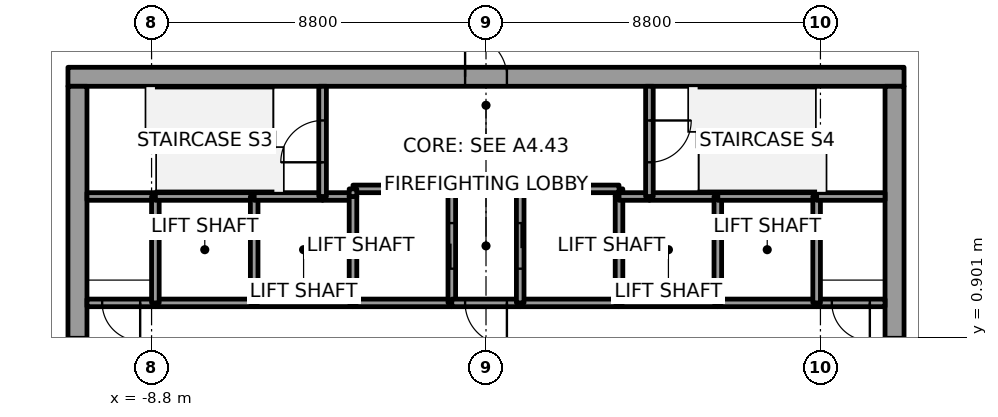
"""IFC4 building model, lengths in metres.
Left out: names, types, materials, properties, quantities, classifications, styles, units other than length and angle.
Written with IfcOpenShell. Run it as: python <this file> out.ifc"""

import sys

from ifc_helpers import new_model, si_unit, direction, frame, frame_2d, origin, place, context, subcontext, project, spatial, rectangle, extrude, element, fill, save


model = new_model("IFC4")
c1 = context("Model", 3, precision=1e-05, world=origin(), true_north=direction((0.0, 1.0)))
c2 = subcontext(c1, "Body", "Model", "MODEL_VIEW")
j1 = project(units=[si_unit("LENGTHUNIT", "METRE"), si_unit("PLANEANGLEUNIT", "RADIAN")], contexts=[c1])
p1 = place(None, origin())
s1 = spatial("IfcSite", under=j1, at=p1, CompositionType="ELEMENT")
p2 = place(p1, origin())
s2 = spatial("IfcBuilding", under=s1, at=p2, CompositionType="ELEMENT")
p3 = place(p2, frame((0.0, 0.0, 185.8)))
s3 = spatial("IfcBuildingStorey", under=s2, at=p3, CompositionType="ELEMENT", Elevation=185.8)
p4 = place(p3, frame((-11.0, 7.75, 0.0), z_axis=(0.0, 0.0, 1.0), x_axis=(1.0, 0.0, 0.0)))
e1 = element("IfcWall", 1, at=p4, inside=s3, PredefinedType="SHEAR", context=c2, shape_type="SweptSolid", body=[
    extrude(rectangle(XDim=22.0, YDim=0.5, at=frame_2d((11.0, 0.0))), origin(), (0.0, 0.0, 1.0), 4.0),
])
p5 = place(p4, frame((10.45, 0.0, 0.0)))
e2 = element("IfcOpeningElement", 2, at=p5, cuts=e1, PredefinedType="OPENING", context=c2, shape_type="SweptSolid", body=[
    extrude(rectangle(XDim=1.1, YDim=2.1, at=frame_2d((0.55, 1.05))), frame((0.0, 0.25, 0.0), z_axis=(0.0, -1.0, 0.0), x_axis=(1.0, 0.0, 0.0)), (0.0, 0.0, 1.0), 0.5),
])
p6 = place(p3, frame((-10.75, -7.5, 0.0), z_axis=(0.0, 0.0, 1.0), x_axis=(0.0, 1.0, 0.0)))
e3 = element("IfcWall", 3, at=p6, inside=s3, PredefinedType="SHEAR", context=c2, shape_type="SweptSolid", body=[
    extrude(rectangle(XDim=15.0, YDim=0.5, at=frame_2d((7.5, 0.0))), origin(), (0.0, 0.0, 1.0), 4.0),
])
p7 = place(p6, frame((6.6, 0.0, 0.0)))
e4 = element("IfcOpeningElement", 4, at=p7, cuts=e3, PredefinedType="OPENING", context=c2, shape_type="SweptSolid", body=[
    extrude(rectangle(XDim=1.8, YDim=2.1, at=frame_2d((0.9, 1.05))), frame((0.0, 0.25, 0.0), z_axis=(0.0, -1.0, 0.0), x_axis=(1.0, 0.0, 0.0)), (0.0, 0.0, 1.0), 0.5),
])
p8 = place(p3, frame((10.75, -7.5, 0.0), z_axis=(0.0, 0.0, 1.0), x_axis=(0.0, 1.0, 0.0)))
e5 = element("IfcWall", 5, at=p8, inside=s3, PredefinedType="SHEAR", context=c2, shape_type="SweptSolid", body=[
    extrude(rectangle(XDim=15.0, YDim=0.5, at=frame_2d((7.5, 0.0))), origin(), (0.0, 0.0, 1.0), 4.0),
])
p9 = place(p8, frame((6.6, 0.0, 0.0)))
e6 = element("IfcOpeningElement", 6, at=p9, cuts=e5, PredefinedType="OPENING", context=c2, shape_type="SweptSolid", body=[
    extrude(rectangle(XDim=1.8, YDim=2.1, at=frame_2d((0.9, 1.05))), frame((0.0, 0.25, 0.0), z_axis=(0.0, -1.0, 0.0), x_axis=(1.0, 0.0, 0.0)), (0.0, 0.0, 1.0), 0.5),
])
p10 = place(p3, frame((-8.7, 1.8, 0.0), z_axis=(0.0, 0.0, 1.0), x_axis=(-1.0, 0.0, 0.0)))
e7 = element("IfcWall", 7, at=p10, inside=s3, PredefinedType="SOLIDWALL", context=c2, shape_type="SweptSolid", body=[
    extrude(rectangle(XDim=1.8, YDim=0.2, at=frame_2d((0.9, 0.0))), origin(), (0.0, 0.0, 1.0), 3.85),
])
p11 = place(p10, frame((0.4, 0.0, 0.0)))
e8 = element("IfcOpeningElement", 8, at=p11, cuts=e7, PredefinedType="OPENING", context=c2, shape_type="SweptSolid", body=[
    extrude(rectangle(XDim=1.0, YDim=2.1, at=frame_2d((0.5, 1.05))), frame((0.0, 0.1, 0.0), z_axis=(0.0, -1.0, 0.0), x_axis=(1.0, 0.0, 0.0)), (0.0, 0.0, 1.0), 0.2),
])
p12 = place(p3, frame((-8.7, 4.6, 0.0), z_axis=(0.0, 0.0, 1.0), x_axis=(-1.0, 0.0, 0.0)))
e9 = element("IfcWall", 9, at=p12, inside=s3, PredefinedType="SOLIDWALL", context=c2, shape_type="SweptSolid", body=[
    extrude(rectangle(XDim=1.8, YDim=0.2, at=frame_2d((0.9, 0.0))), origin(), (0.0, 0.0, 1.0), 3.85),
])
p13 = place(p3, frame((-6.1, 1.8, 0.0), z_axis=(0.0, 0.0, 1.0), x_axis=(-1.0, 0.0, 0.0)))
e10 = element("IfcWall", 10, at=p13, inside=s3, PredefinedType="SOLIDWALL", context=c2, shape_type="SweptSolid", body=[
    extrude(rectangle(XDim=2.6, YDim=0.2, at=frame_2d((1.3, 0.0))), origin(), (0.0, 0.0, 1.0), 3.85),
])
p14 = place(p3, frame((-8.7, 1.8, 0.0), z_axis=(0.0, 0.0, 1.0), x_axis=(0.0, 1.0, 0.0)))
e11 = element("IfcWall", 11, at=p14, inside=s3, PredefinedType="SOLIDWALL", context=c2, shape_type="SweptSolid", body=[
    extrude(rectangle(XDim=2.8, YDim=0.2, at=frame_2d((1.4, 0.0))), origin(), (0.0, 0.0, 1.0), 3.85),
])
p15 = place(p3, frame((-6.1, 4.6, 0.0), z_axis=(0.0, 0.0, 1.0), x_axis=(-1.0, 0.0, 0.0)))
e12 = element("IfcWall", 12, at=p15, inside=s3, PredefinedType="SOLIDWALL", context=c2, shape_type="SweptSolid", body=[
    extrude(rectangle(XDim=2.6, YDim=0.2, at=frame_2d((1.3, 0.0))), origin(), (0.0, 0.0, 1.0), 3.85),
])
p16 = place(p3, frame((-3.5, 1.8, 0.0), z_axis=(0.0, 0.0, 1.0), x_axis=(-1.0, 0.0, 0.0)))
e13 = element("IfcWall", 13, at=p16, inside=s3, PredefinedType="SOLIDWALL", context=c2, shape_type="SweptSolid", body=[
    extrude(rectangle(XDim=2.6, YDim=0.2, at=frame_2d((1.3, 0.0))), origin(), (0.0, 0.0, 1.0), 3.85),
])
p17 = place(p3, frame((-6.1, 1.8, 0.0), z_axis=(0.0, 0.0, 1.0), x_axis=(0.0, 1.0, 0.0)))
e14 = element("IfcWall", 14, at=p17, inside=s3, PredefinedType="SOLIDWALL", context=c2, shape_type="SweptSolid", body=[
    extrude(rectangle(XDim=2.8, YDim=0.2, at=frame_2d((1.4, 0.0))), origin(), (0.0, 0.0, 1.0), 3.85),
])
p18 = place(p3, frame((-4.3, 4.6, 0.0), z_axis=(0.0, 0.0, 1.0), x_axis=(-1.0, 0.0, 0.0)))
e15 = element("IfcWall", 15, at=p18, inside=s3, PredefinedType="SOLIDWALL", context=c2, shape_type="SweptSolid", body=[
    extrude(rectangle(XDim=1.8, YDim=0.2, at=frame_2d((0.9, 0.0))), origin(), (0.0, 0.0, 1.0), 3.85),
])
p19 = place(p3, frame((-3.5, 4.6, 0.0), z_axis=(0.0, 0.0, 1.0), x_axis=(-1.0, 0.0, 0.0)))
e16 = element("IfcWall", 16, at=p19, inside=s3, PredefinedType="SOLIDWALL", context=c2, shape_type="SweptSolid", body=[
    extrude(rectangle(XDim=0.8, YDim=0.2, at=frame_2d((0.4, 0.0))), origin(), (0.0, 0.0, 1.0), 3.85),
])
p20 = place(p3, frame((-4.3, 4.6, 0.0), z_axis=(0.0, 0.0, 1.0), x_axis=(0.0, 1.0, 0.0)))
e17 = element("IfcWall", 17, at=p20, inside=s3, PredefinedType="SOLIDWALL", context=c2, shape_type="SweptSolid", body=[
    extrude(rectangle(XDim=2.9, YDim=0.2, at=frame_2d((1.45, 0.0))), origin(), (0.0, 0.0, 1.0), 3.85),
])
p21 = place(p20, frame((0.9, 0.0, 0.0)))
e18 = element("IfcOpeningElement", 18, at=p21, cuts=e17, PredefinedType="OPENING", context=c2, shape_type="SweptSolid", body=[
    extrude(rectangle(XDim=1.1, YDim=2.1, at=frame_2d((0.55, 1.05))), frame((0.0, 0.1, 0.0), z_axis=(0.0, -1.0, 0.0), x_axis=(1.0, 0.0, 0.0)), (0.0, 0.0, 1.0), 0.2),
])
p22 = place(p3, frame((-0.9, 1.8, 0.0), z_axis=(0.0, 0.0, 1.0), x_axis=(-1.0, 0.0, 0.0)))
e19 = element("IfcWall", 19, at=p22, inside=s3, PredefinedType="SOLIDWALL", context=c2, shape_type="SweptSolid", body=[
    extrude(rectangle(XDim=2.6, YDim=0.2, at=frame_2d((1.3, 0.0))), origin(), (0.0, 0.0, 1.0), 3.85),
])
p23 = place(p3, frame((-3.5, 4.6, 0.0), z_axis=(0.0, 0.0, 1.0), x_axis=(0.0, -1.0, 0.0)))
e20 = element("IfcWall", 20, at=p23, inside=s3, PredefinedType="SOLIDWALL", context=c2, shape_type="SweptSolid", body=[
    extrude(rectangle(XDim=2.8, YDim=0.2, at=frame_2d((1.4, 0.0))), origin(), (0.0, 0.0, 1.0), 3.85),
])
p24 = place(p3, frame((-0.9, 1.8, 0.0), z_axis=(0.0, 0.0, 1.0), x_axis=(0.0, 1.0, 0.0)))
e21 = element("IfcWall", 21, at=p24, inside=s3, PredefinedType="SOLIDWALL", context=c2, shape_type="SweptSolid", body=[
    extrude(rectangle(XDim=3.0, YDim=0.2, at=frame_2d((1.5, 0.0))), origin(), (0.0, 0.0, 1.0), 3.85),
])
p25 = place(p24, frame((0.9, 0.0, 0.0)))
e22 = element("IfcOpeningElement", 22, at=p25, cuts=e21, PredefinedType="OPENING", context=c2, shape_type="SweptSolid", body=[
    extrude(rectangle(XDim=1.2, YDim=2.1, at=frame_2d((0.6, 1.05))), frame((0.0, 0.1, 0.0), z_axis=(0.0, -1.0, 0.0), x_axis=(1.0, 0.0, 0.0)), (0.0, 0.0, 1.0), 0.2),
])
p26 = place(p3, frame((-0.9, 4.8, 0.0), z_axis=(0.0, 0.0, 1.0), x_axis=(-1.0, 0.0, 0.0)))
e23 = element("IfcWall", 23, at=p26, inside=s3, PredefinedType="SOLIDWALL", context=c2, shape_type="SweptSolid", body=[
    extrude(rectangle(XDim=2.6, YDim=0.2, at=frame_2d((1.3, 0.0))), origin(), (0.0, 0.0, 1.0), 3.85),
])
p27 = place(p3, frame((-3.5, 4.8, 0.0), z_axis=(0.0, 0.0, 1.0), x_axis=(0.0, -1.0, 0.0)))
e24 = element("IfcWall", 24, at=p27, inside=s3, PredefinedType="SOLIDWALL", context=c2, shape_type="SweptSolid", body=[
    extrude(rectangle(XDim=0.2, YDim=0.2, at=frame_2d((0.1, 0.0))), origin(), (0.0, 0.0, 1.0), 3.85),
])
p28 = place(p3, frame((0.9, 1.8, 0.0), z_axis=(0.0, 0.0, 1.0), x_axis=(-1.0, 0.0, 0.0)))
e25 = element("IfcWall", 25, at=p28, inside=s3, PredefinedType="SOLIDWALL", context=c2, shape_type="SweptSolid", body=[
    extrude(rectangle(XDim=1.8, YDim=0.2, at=frame_2d((0.9, 0.0))), origin(), (0.0, 0.0, 1.0), 3.85),
])
p29 = place(p28, frame((0.35, 0.0, 0.0)))
e26 = element("IfcOpeningElement", 26, at=p29, cuts=e25, PredefinedType="OPENING", context=c2, shape_type="SweptSolid", body=[
    extrude(rectangle(XDim=1.1, YDim=2.1, at=frame_2d((0.55, 1.05))), frame((0.0, 0.1, 0.0), z_axis=(0.0, -1.0, 0.0), x_axis=(1.0, 0.0, 0.0)), (0.0, 0.0, 1.0), 0.2),
])
p30 = place(p3, frame((3.5, 1.8, 0.0), z_axis=(0.0, 0.0, 1.0), x_axis=(-1.0, 0.0, 0.0)))
e27 = element("IfcWall", 27, at=p30, inside=s3, PredefinedType="SOLIDWALL", context=c2, shape_type="SweptSolid", body=[
    extrude(rectangle(XDim=2.6, YDim=0.2, at=frame_2d((1.3, 0.0))), origin(), (0.0, 0.0, 1.0), 3.85),
])
p31 = place(p3, frame((3.5, 4.6, 0.0), z_axis=(0.0, 0.0, 1.0), x_axis=(0.0, 1.0, 0.0)))
e28 = element("IfcWall", 28, at=p31, inside=s3, PredefinedType="SOLIDWALL", context=c2, shape_type="SweptSolid", body=[
    extrude(rectangle(XDim=0.2, YDim=0.2, at=frame_2d((0.1, 0.0))), origin(), (0.0, 0.0, 1.0), 3.85),
])
p32 = place(p3, frame((3.5, 4.8, 0.0), z_axis=(0.0, 0.0, 1.0), x_axis=(-1.0, 0.0, 0.0)))
e29 = element("IfcWall", 29, at=p32, inside=s3, PredefinedType="SOLIDWALL", context=c2, shape_type="SweptSolid", body=[
    extrude(rectangle(XDim=2.6, YDim=0.2, at=frame_2d((1.3, 0.0))), origin(), (0.0, 0.0, 1.0), 3.85),
])
p33 = place(p3, frame((0.9, 4.8, 0.0), z_axis=(0.0, 0.0, 1.0), x_axis=(0.0, -1.0, 0.0)))
e30 = element("IfcWall", 30, at=p33, inside=s3, PredefinedType="SOLIDWALL", context=c2, shape_type="SweptSolid", body=[
    extrude(rectangle(XDim=3.0, YDim=0.2, at=frame_2d((1.5, 0.0))), origin(), (0.0, 0.0, 1.0), 3.85),
])
p34 = place(p33, frame((0.9, 0.0, 0.0)))
e31 = element("IfcOpeningElement", 31, at=p34, cuts=e30, PredefinedType="OPENING", context=c2, shape_type="SweptSolid", body=[
    extrude(rectangle(XDim=1.2, YDim=2.1, at=frame_2d((0.6, 1.05))), frame((0.0, 0.1, 0.0), z_axis=(0.0, -1.0, 0.0), x_axis=(1.0, 0.0, 0.0)), (0.0, 0.0, 1.0), 0.2),
])
p35 = place(p3, frame((6.1, 1.8, 0.0), z_axis=(0.0, 0.0, 1.0), x_axis=(-1.0, 0.0, 0.0)))
e32 = element("IfcWall", 32, at=p35, inside=s3, PredefinedType="SOLIDWALL", context=c2, shape_type="SweptSolid", body=[
    extrude(rectangle(XDim=2.6, YDim=0.2, at=frame_2d((1.3, 0.0))), origin(), (0.0, 0.0, 1.0), 3.85),
])
p36 = place(p3, frame((3.5, 1.8, 0.0), z_axis=(0.0, 0.0, 1.0), x_axis=(0.0, 1.0, 0.0)))
e33 = element("IfcWall", 33, at=p36, inside=s3, PredefinedType="SOLIDWALL", context=c2, shape_type="SweptSolid", body=[
    extrude(rectangle(XDim=2.8, YDim=0.2, at=frame_2d((1.4, 0.0))), origin(), (0.0, 0.0, 1.0), 3.85),
])
p37 = place(p3, frame((4.3, 4.6, 0.0), z_axis=(0.0, 0.0, 1.0), x_axis=(-1.0, 0.0, 0.0)))
e34 = element("IfcWall", 34, at=p37, inside=s3, PredefinedType="SOLIDWALL", context=c2, shape_type="SweptSolid", body=[
    extrude(rectangle(XDim=0.8, YDim=0.2, at=frame_2d((0.4, 0.0))), origin(), (0.0, 0.0, 1.0), 3.85),
])
p38 = place(p3, frame((6.1, 4.6, 0.0), z_axis=(0.0, 0.0, 1.0), x_axis=(-1.0, 0.0, 0.0)))
e35 = element("IfcWall", 35, at=p38, inside=s3, PredefinedType="SOLIDWALL", context=c2, shape_type="SweptSolid", body=[
    extrude(rectangle(XDim=1.8, YDim=0.2, at=frame_2d((0.9, 0.0))), origin(), (0.0, 0.0, 1.0), 3.85),
])
p39 = place(p3, frame((4.3, 7.5, 0.0), z_axis=(0.0, 0.0, 1.0), x_axis=(0.0, -1.0, 0.0)))
e36 = element("IfcWall", 36, at=p39, inside=s3, PredefinedType="SOLIDWALL", context=c2, shape_type="SweptSolid", body=[
    extrude(rectangle(XDim=2.9, YDim=0.2, at=frame_2d((1.45, 0.0))), origin(), (0.0, 0.0, 1.0), 3.85),
])
p40 = place(p39, frame((0.9, 0.0, 0.0)))
e37 = element("IfcOpeningElement", 37, at=p40, cuts=e36, PredefinedType="OPENING", context=c2, shape_type="SweptSolid", body=[
    extrude(rectangle(XDim=1.1, YDim=2.1, at=frame_2d((0.55, 1.05))), frame((0.0, 0.1, 0.0), z_axis=(0.0, -1.0, 0.0), x_axis=(1.0, 0.0, 0.0)), (0.0, 0.0, 1.0), 0.2),
])
p41 = place(p3, frame((8.7, 1.8, 0.0), z_axis=(0.0, 0.0, 1.0), x_axis=(-1.0, 0.0, 0.0)))
e38 = element("IfcWall", 38, at=p41, inside=s3, PredefinedType="SOLIDWALL", context=c2, shape_type="SweptSolid", body=[
    extrude(rectangle(XDim=2.6, YDim=0.2, at=frame_2d((1.3, 0.0))), origin(), (0.0, 0.0, 1.0), 3.85),
])
p42 = place(p3, frame((6.1, 1.8, 0.0), z_axis=(0.0, 0.0, 1.0), x_axis=(0.0, 1.0, 0.0)))
e39 = element("IfcWall", 39, at=p42, inside=s3, PredefinedType="SOLIDWALL", context=c2, shape_type="SweptSolid", body=[
    extrude(rectangle(XDim=2.8, YDim=0.2, at=frame_2d((1.4, 0.0))), origin(), (0.0, 0.0, 1.0), 3.85),
])
p43 = place(p3, frame((8.7, 4.6, 0.0), z_axis=(0.0, 0.0, 1.0), x_axis=(-1.0, 0.0, 0.0)))
e40 = element("IfcWall", 40, at=p43, inside=s3, PredefinedType="SOLIDWALL", context=c2, shape_type="SweptSolid", body=[
    extrude(rectangle(XDim=2.6, YDim=0.2, at=frame_2d((1.3, 0.0))), origin(), (0.0, 0.0, 1.0), 3.85),
])
p44 = place(p3, frame((10.5, 1.8, 0.0), z_axis=(0.0, 0.0, 1.0), x_axis=(-1.0, 0.0, 0.0)))
e41 = element("IfcWall", 41, at=p44, inside=s3, PredefinedType="SOLIDWALL", context=c2, shape_type="SweptSolid", body=[
    extrude(rectangle(XDim=1.8, YDim=0.2, at=frame_2d((0.9, 0.0))), origin(), (0.0, 0.0, 1.0), 3.85),
])
p45 = place(p44, frame((0.4, 0.0, 0.0)))
e42 = element("IfcOpeningElement", 42, at=p45, cuts=e41, PredefinedType="OPENING", context=c2, shape_type="SweptSolid", body=[
    extrude(rectangle(XDim=1.0, YDim=2.1, at=frame_2d((0.5, 1.05))), frame((0.0, 0.1, 0.0), z_axis=(0.0, -1.0, 0.0), x_axis=(1.0, 0.0, 0.0)), (0.0, 0.0, 1.0), 0.2),
])
p46 = place(p3, frame((8.7, 4.6, 0.0), z_axis=(0.0, 0.0, 1.0), x_axis=(0.0, -1.0, 0.0)))
e43 = element("IfcWall", 43, at=p46, inside=s3, PredefinedType="SOLIDWALL", context=c2, shape_type="SweptSolid", body=[
    extrude(rectangle(XDim=2.8, YDim=0.2, at=frame_2d((1.4, 0.0))), origin(), (0.0, 0.0, 1.0), 3.85),
])
p47 = place(p3, frame((10.5, 4.6, 0.0), z_axis=(0.0, 0.0, 1.0), x_axis=(-1.0, 0.0, 0.0)))
e44 = element("IfcWall", 44, at=p47, inside=s3, PredefinedType="SOLIDWALL", context=c2, shape_type="SweptSolid", body=[
    extrude(rectangle(XDim=1.8, YDim=0.2, at=frame_2d((0.9, 0.0))), origin(), (0.0, 0.0, 1.0), 3.85),
])
p48 = place(p25, origin())
e45 = element("IfcDoor", 45, at=p48, inside=s3, OperationType="SLIDING_TO_RIGHT", PredefinedType="DOOR", context=c2, shape_type="SweptSolid", body=[
    extrude(rectangle(XDim=1.2, YDim=2.1, at=frame_2d((0.6, 1.05))), frame((0.0, 0.025, 0.0), z_axis=(0.0, -1.0, 0.0), x_axis=(1.0, 0.0, 0.0)), (0.0, 0.0, 1.0), 0.05),
])
fill(e22, e45)
p49 = place(p34, origin())
e46 = element("IfcDoor", 46, at=p49, inside=s3, OperationType="SLIDING_TO_LEFT", PredefinedType="DOOR", context=c2, shape_type="SweptSolid", body=[
    extrude(rectangle(XDim=1.2, YDim=2.1, at=frame_2d((0.6, 1.05))), frame((0.0, 0.025, 0.0), z_axis=(0.0, -1.0, 0.0), x_axis=(1.0, 0.0, 0.0)), (0.0, 0.0, 1.0), 0.05),
])
fill(e31, e46)
p50 = place(p29, origin())
e47 = element("IfcDoor", 47, at=p50, inside=s3, OperationType="SINGLE_SWING_RIGHT", PredefinedType="DOOR", context=c2, shape_type="SweptSolid", body=[
    extrude(rectangle(XDim=1.1, YDim=2.1, at=frame_2d((0.55, 1.05))), frame((0.0, 0.025, 0.0), z_axis=(0.0, -1.0, 0.0), x_axis=(1.0, 0.0, 0.0)), (0.0, 0.0, 1.0), 0.05),
])
fill(e26, e47)
p51 = place(p11, origin())
e48 = element("IfcDoor", 48, at=p51, inside=s3, OperationType="SINGLE_SWING_RIGHT", PredefinedType="DOOR", context=c2, shape_type="SweptSolid", body=[
    extrude(rectangle(XDim=1.0, YDim=2.1, at=frame_2d((0.5, 1.05))), frame((0.0, 0.025, 0.0), z_axis=(0.0, -1.0, 0.0), x_axis=(1.0, 0.0, 0.0)), (0.0, 0.0, 1.0), 0.05),
])
fill(e8, e48)
p52 = place(p45, origin())
e49 = element("IfcDoor", 49, at=p52, inside=s3, OperationType="SINGLE_SWING_LEFT", PredefinedType="DOOR", context=c2, shape_type="SweptSolid", body=[
    extrude(rectangle(XDim=1.0, YDim=2.1, at=frame_2d((0.5, 1.05))), frame((0.0, 0.025, 0.0), z_axis=(0.0, -1.0, 0.0), x_axis=(1.0, 0.0, 0.0)), (0.0, 0.0, 1.0), 0.05),
])
fill(e42, e49)
p53 = place(p21, origin())
e50 = element("IfcDoor", 50, at=p53, inside=s3, OperationType="SINGLE_SWING_LEFT", PredefinedType="DOOR", context=c2, shape_type="SweptSolid", body=[
    extrude(rectangle(XDim=1.1, YDim=2.1, at=frame_2d((0.55, 1.05))), frame((0.0, 0.025, 0.0), z_axis=(0.0, -1.0, 0.0), x_axis=(1.0, 0.0, 0.0)), (0.0, 0.0, 1.0), 0.05),
])
fill(e18, e50)
p54 = place(p40, origin())
e51 = element("IfcDoor", 51, at=p54, inside=s3, OperationType="SINGLE_SWING_LEFT", PredefinedType="DOOR", context=c2, shape_type="SweptSolid", body=[
    extrude(rectangle(XDim=1.1, YDim=2.1, at=frame_2d((0.55, 1.05))), frame((0.0, 0.025, 0.0), z_axis=(0.0, -1.0, 0.0), x_axis=(1.0, 0.0, 0.0)), (0.0, 0.0, 1.0), 0.05),
])
fill(e37, e51)
p55 = place(p7, origin())
e52 = element("IfcDoor", 52, at=p55, inside=s3, OperationType="DOUBLE_DOOR_SINGLE_SWING", PredefinedType="DOOR", context=c2, shape_type="SweptSolid", body=[
    extrude(rectangle(XDim=1.8, YDim=2.1, at=frame_2d((0.9, 1.05))), frame((0.0, 0.025, 0.0), z_axis=(0.0, -1.0, 0.0), x_axis=(1.0, 0.0, 0.0)), (0.0, 0.0, 1.0), 0.05),
])
fill(e4, e52)
p56 = place(p9, origin())
e53 = element("IfcDoor", 53, at=p56, inside=s3, OperationType="DOUBLE_DOOR_SINGLE_SWING", PredefinedType="DOOR", context=c2, shape_type="SweptSolid", body=[
    extrude(rectangle(XDim=1.8, YDim=2.1, at=frame_2d((0.9, 1.05))), frame((0.0, 0.025, 0.0), z_axis=(0.0, -1.0, 0.0), x_axis=(1.0, 0.0, 0.0)), (0.0, 0.0, 1.0), 0.05),
])
fill(e6, e53)
p57 = place(p5, origin())
e54 = element("IfcDoor", 54, at=p57, inside=s3, OperationType="SINGLE_SWING_RIGHT", PredefinedType="DOOR", context=c2, shape_type="SweptSolid", body=[
    extrude(rectangle(XDim=1.1, YDim=2.1, at=frame_2d((0.55, 1.05))), frame((0.0, 0.025, 0.0), z_axis=(0.0, -1.0, 0.0), x_axis=(1.0, 0.0, 0.0)), (0.0, 0.0, 1.0), 0.05),
])
fill(e2, e54)
save(model, sys.argv[1])
